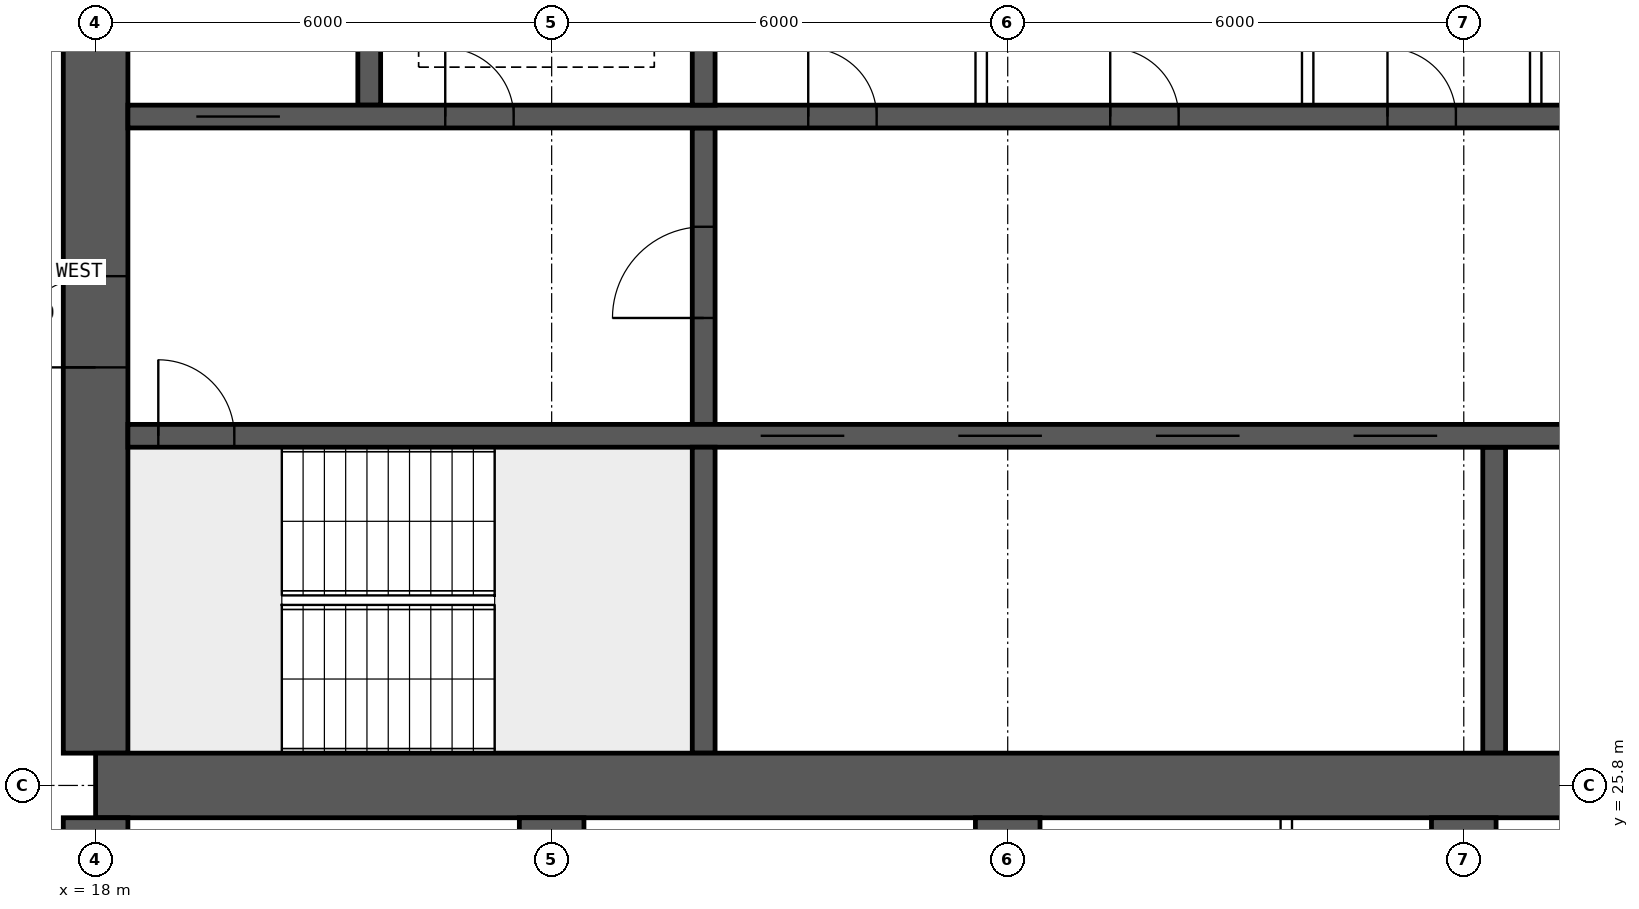
"""IFC4 building model, lengths in metres.
Left out: names, types, materials, properties, quantities, classifications, styles, units other than length and angle.
Written with IfcOpenShell. Run it as: python <this file> out.ifc"""

import sys

from ifc_helpers import new_model, si_unit, direction, frame, frame_2d, origin, place, context, subcontext, project, spatial, rectangle, extrude, element, fill, save


model = new_model("IFC4")
c1 = context("Model", 3, precision=1e-05, world=origin(), true_north=direction((0.0, 1.0)))
c2 = subcontext(c1, "Body", "Model", "MODEL_VIEW")
j1 = project(units=[si_unit("LENGTHUNIT", "METRE"), si_unit("PLANEANGLEUNIT", "RADIAN")], contexts=[c1])
p1 = place(None, origin())
s1 = spatial("IfcSite", under=j1, at=p1, CompositionType="ELEMENT")
p2 = place(p1, origin())
s2 = spatial("IfcBuilding", under=s1, at=p2, CompositionType="ELEMENT")
p3 = place(p2, frame((0.0, 0.0, 178.6)))
s3 = spatial("IfcBuildingStorey", under=s2, at=p3, CompositionType="ELEMENT", Elevation=178.6)
p4 = place(p3, frame((18.0, 25.8, 0.0), z_axis=(0.0, 0.0, 1.0), x_axis=(1.0, 0.0, 0.0)))
e1 = element("IfcWall", 1, at=p4, inside=s3, PredefinedType="SHEAR", context=c2, shape_type="SweptSolid", body=[
    extrude(rectangle(XDim=48.0, YDim=0.85, at=frame_2d((24.0, 0.0))), origin(), (0.0, 0.0, 1.0), 3.75),
])
p5 = place(p3, frame((18.0, 26.225, 0.0), z_axis=(0.0, 0.0, 1.0), x_axis=(0.0, 1.0, 0.0)))
e2 = element("IfcWall", 2, at=p5, inside=s3, PredefinedType="SHEAR", context=c2, shape_type="SweptSolid", body=[
    extrude(rectangle(XDim=11.55, YDim=0.85, at=frame_2d((5.775, 0.0))), origin(), (0.0, 0.0, 1.0), 3.75),
])
p6 = place(p5, frame((5.075, 0.0, 0.0)))
e3 = element("IfcOpeningElement", 3, at=p6, cuts=e2, PredefinedType="OPENING", context=c2, shape_type="SweptSolid", body=[
    extrude(rectangle(XDim=1.2, YDim=2.1, at=frame_2d((0.6, 1.05))), frame((0.0, 0.435, 0.0), z_axis=(0.0, -1.0, 0.0), x_axis=(1.0, 0.0, 0.0)), (0.0, 0.0, 1.0), 0.87),
])
p7 = place(p3, frame((18.425, 30.4, 0.0), z_axis=(0.0, 0.0, 1.0), x_axis=(1.0, 0.0, 0.0)))
e4 = element("IfcWall", 4, at=p7, inside=s3, PredefinedType="SHEAR", context=c2, shape_type="SweptSolid", body=[
    extrude(rectangle(XDim=47.15, YDim=0.3, at=frame_2d((23.575, 0.0))), origin(), (0.0, 0.0, 1.0), 3.75),
])
p8 = place(p7, frame((0.4, 0.0, 0.0)))
e5 = element("IfcOpeningElement", 5, at=p8, cuts=e4, PredefinedType="OPENING", context=c2, shape_type="SweptSolid", body=[
    extrude(rectangle(XDim=1.0, YDim=2.1, at=frame_2d((0.5, 1.05))), frame((0.0, 0.16, 0.0), z_axis=(0.0, -1.0, 0.0), x_axis=(1.0, 0.0, 0.0)), (0.0, 0.0, 1.0), 0.32),
])
p9 = place(p7, frame((45.75, 0.0, 0.0)))
e6 = element("IfcOpeningElement", 6, at=p9, cuts=e4, PredefinedType="OPENING", context=c2, shape_type="SweptSolid", body=[
    extrude(rectangle(XDim=1.0, YDim=2.1, at=frame_2d((0.5, 1.05))), frame((0.0, 0.16, 0.0), z_axis=(0.0, -1.0, 0.0), x_axis=(1.0, 0.0, 0.0)), (0.0, 0.0, 1.0), 0.32),
])
p10 = place(p7, frame((8.325, 0.0, 0.0)))
e7 = element("IfcOpeningElement", 7, at=p10, cuts=e4, PredefinedType="OPENING", context=c2, shape_type="SweptSolid", body=[
    extrude(rectangle(XDim=1.1, YDim=2.1, at=frame_2d((0.55, 1.05))), frame((0.0, 0.16, 0.0), z_axis=(0.0, -1.0, 0.0), x_axis=(1.0, 0.0, 0.0)), (0.0, 0.0, 1.0), 0.32),
])
p11 = place(p7, frame((10.925, 0.0, 0.0)))
e8 = element("IfcOpeningElement", 8, at=p11, cuts=e4, PredefinedType="OPENING", context=c2, shape_type="SweptSolid", body=[
    extrude(rectangle(XDim=1.1, YDim=2.1, at=frame_2d((0.55, 1.05))), frame((0.0, 0.16, 0.0), z_axis=(0.0, -1.0, 0.0), x_axis=(1.0, 0.0, 0.0)), (0.0, 0.0, 1.0), 0.32),
])
p12 = place(p7, frame((13.525, 0.0, 0.0)))
e9 = element("IfcOpeningElement", 9, at=p12, cuts=e4, PredefinedType="OPENING", context=c2, shape_type="SweptSolid", body=[
    extrude(rectangle(XDim=1.1, YDim=2.1, at=frame_2d((0.55, 1.05))), frame((0.0, 0.16, 0.0), z_axis=(0.0, -1.0, 0.0), x_axis=(1.0, 0.0, 0.0)), (0.0, 0.0, 1.0), 0.32),
])
p13 = place(p7, frame((16.125, 0.0, 0.0)))
e10 = element("IfcOpeningElement", 10, at=p13, cuts=e4, PredefinedType="OPENING", context=c2, shape_type="SweptSolid", body=[
    extrude(rectangle(XDim=1.1, YDim=2.1, at=frame_2d((0.55, 1.05))), frame((0.0, 0.16, 0.0), z_axis=(0.0, -1.0, 0.0), x_axis=(1.0, 0.0, 0.0)), (0.0, 0.0, 1.0), 0.32),
])
p14 = place(p7, frame((18.9, 0.0, 0.0)))
e11 = element("IfcOpeningElement", 11, at=p14, cuts=e4, PredefinedType="OPENING", context=c2, shape_type="SweptSolid", body=[
    extrude(rectangle(XDim=0.9, YDim=2.1, at=frame_2d((0.45, 1.05))), frame((0.0, 0.16, 0.0), z_axis=(0.0, -1.0, 0.0), x_axis=(1.0, 0.0, 0.0)), (0.0, 0.0, 1.0), 0.32),
])
p15 = place(p7, frame((30.192, 0.0, 0.0)))
e12 = element("IfcOpeningElement", 12, at=p15, cuts=e4, PredefinedType="OPENING", context=c2, shape_type="SweptSolid", body=[
    extrude(rectangle(XDim=1.1, YDim=2.1, at=frame_2d((0.55, 1.05))), frame((0.0, 0.16, 0.0), z_axis=(0.0, -1.0, 0.0), x_axis=(1.0, 0.0, 0.0)), (0.0, 0.0, 1.0), 0.32),
])
p16 = place(p7, frame((33.725, 0.0, 0.0)))
e13 = element("IfcOpeningElement", 13, at=p16, cuts=e4, PredefinedType="OPENING", context=c2, shape_type="SweptSolid", body=[
    extrude(rectangle(XDim=1.1, YDim=2.1, at=frame_2d((0.55, 1.05))), frame((0.0, 0.16, 0.0), z_axis=(0.0, -1.0, 0.0), x_axis=(1.0, 0.0, 0.0)), (0.0, 0.0, 1.0), 0.32),
])
p17 = place(p7, frame((37.258, 0.0, 0.0)))
e14 = element("IfcOpeningElement", 14, at=p17, cuts=e4, PredefinedType="OPENING", context=c2, shape_type="SweptSolid", body=[
    extrude(rectangle(XDim=1.1, YDim=2.1, at=frame_2d((0.55, 1.05))), frame((0.0, 0.16, 0.0), z_axis=(0.0, -1.0, 0.0), x_axis=(1.0, 0.0, 0.0)), (0.0, 0.0, 1.0), 0.32),
])
p18 = place(p3, frame((18.425, 34.6, 0.0), z_axis=(0.0, 0.0, 1.0), x_axis=(1.0, 0.0, 0.0)))
e15 = element("IfcWall", 15, at=p18, inside=s3, PredefinedType="SHEAR", context=c2, shape_type="SweptSolid", body=[
    extrude(rectangle(XDim=47.15, YDim=0.3, at=frame_2d((23.575, 0.0))), origin(), (0.0, 0.0, 1.0), 3.75),
])
p19 = place(p18, frame((0.9, 0.0, 0.0)))
e16 = element("IfcOpeningElement", 16, at=p19, cuts=e15, PredefinedType="OPENING", context=c2, shape_type="SweptSolid", body=[
    extrude(rectangle(XDim=1.1, YDim=2.1, at=frame_2d((0.55, 1.05))), frame((0.0, 0.16, 0.0), z_axis=(0.0, -1.0, 0.0), x_axis=(1.0, 0.0, 0.0)), (0.0, 0.0, 1.0), 0.32),
])
p20 = place(p18, frame((45.15, 0.0, 0.0)))
e17 = element("IfcOpeningElement", 17, at=p20, cuts=e15, PredefinedType="OPENING", context=c2, shape_type="SweptSolid", body=[
    extrude(rectangle(XDim=1.1, YDim=2.1, at=frame_2d((0.55, 1.05))), frame((0.0, 0.16, 0.0), z_axis=(0.0, -1.0, 0.0), x_axis=(1.0, 0.0, 0.0)), (0.0, 0.0, 1.0), 0.32),
])
p21 = place(p18, frame((4.175, 0.0, 0.0)))
e18 = element("IfcOpeningElement", 18, at=p21, cuts=e15, PredefinedType="OPENING", context=c2, shape_type="SweptSolid", body=[
    extrude(rectangle(XDim=0.9, YDim=2.1, at=frame_2d((0.45, 1.05))), frame((0.0, 0.16, 0.0), z_axis=(0.0, -1.0, 0.0), x_axis=(1.0, 0.0, 0.0)), (0.0, 0.0, 1.0), 0.32),
])
p22 = place(p18, frame((42.075, 0.0, 0.0)))
e19 = element("IfcOpeningElement", 19, at=p22, cuts=e15, PredefinedType="OPENING", context=c2, shape_type="SweptSolid", body=[
    extrude(rectangle(XDim=0.9, YDim=2.1, at=frame_2d((0.45, 1.05))), frame((0.0, 0.16, 0.0), z_axis=(0.0, -1.0, 0.0), x_axis=(1.0, 0.0, 0.0)), (0.0, 0.0, 1.0), 0.32),
])
p23 = place(p18, frame((8.95, 0.0, 0.0)))
e20 = element("IfcOpeningElement", 20, at=p23, cuts=e15, PredefinedType="OPENING", context=c2, shape_type="SweptSolid", body=[
    extrude(rectangle(XDim=0.9, YDim=2.1, at=frame_2d((0.45, 1.05))), frame((0.0, 0.16, 0.0), z_axis=(0.0, -1.0, 0.0), x_axis=(1.0, 0.0, 0.0)), (0.0, 0.0, 1.0), 0.32),
])
p24 = place(p18, frame((12.924, 0.0, 0.0)))
e21 = element("IfcOpeningElement", 21, at=p24, cuts=e15, PredefinedType="OPENING", context=c2, shape_type="SweptSolid", body=[
    extrude(rectangle(XDim=0.9, YDim=2.1, at=frame_2d((0.45, 1.05))), frame((0.0, 0.16, 0.0), z_axis=(0.0, -1.0, 0.0), x_axis=(1.0, 0.0, 0.0)), (0.0, 0.0, 1.0), 0.32),
])
p25 = place(p18, frame((16.571, 0.0, 0.0)))
e22 = element("IfcOpeningElement", 22, at=p25, cuts=e15, PredefinedType="OPENING", context=c2, shape_type="SweptSolid", body=[
    extrude(rectangle(XDim=0.9, YDim=2.1, at=frame_2d((0.45, 1.05))), frame((0.0, 0.16, 0.0), z_axis=(0.0, -1.0, 0.0), x_axis=(1.0, 0.0, 0.0)), (0.0, 0.0, 1.0), 0.32),
])
p26 = place(p18, frame((20.33, 0.0, 0.0)))
e23 = element("IfcOpeningElement", 23, at=p26, cuts=e15, PredefinedType="OPENING", context=c2, shape_type="SweptSolid", body=[
    extrude(rectangle(XDim=0.9, YDim=2.1, at=frame_2d((0.45, 1.05))), frame((0.0, 0.16, 0.0), z_axis=(0.0, -1.0, 0.0), x_axis=(1.0, 0.0, 0.0)), (0.0, 0.0, 1.0), 0.32),
])
p27 = place(p18, frame((24.736, 0.0, 0.0)))
e24 = element("IfcOpeningElement", 24, at=p27, cuts=e15, PredefinedType="OPENING", context=c2, shape_type="SweptSolid", body=[
    extrude(rectangle(XDim=0.9, YDim=2.1, at=frame_2d((0.45, 1.05))), frame((0.0, 0.16, 0.0), z_axis=(0.0, -1.0, 0.0), x_axis=(1.0, 0.0, 0.0)), (0.0, 0.0, 1.0), 0.32),
])
p28 = place(p18, frame((27.533, 0.0, 0.0)))
e25 = element("IfcOpeningElement", 25, at=p28, cuts=e15, PredefinedType="OPENING", context=c2, shape_type="SweptSolid", body=[
    extrude(rectangle(XDim=0.9, YDim=2.1, at=frame_2d((0.45, 1.05))), frame((0.0, 0.16, 0.0), z_axis=(0.0, -1.0, 0.0), x_axis=(1.0, 0.0, 0.0)), (0.0, 0.0, 1.0), 0.32),
])
p29 = place(p18, frame((33.654, 0.0, 0.0)))
e26 = element("IfcOpeningElement", 26, at=p29, cuts=e15, PredefinedType="OPENING", context=c2, shape_type="SweptSolid", body=[
    extrude(rectangle(XDim=0.9, YDim=2.1, at=frame_2d((0.45, 1.05))), frame((0.0, 0.16, 0.0), z_axis=(0.0, -1.0, 0.0), x_axis=(1.0, 0.0, 0.0)), (0.0, 0.0, 1.0), 0.32),
])
p30 = place(p3, frame((26.0, 26.225, 0.0), z_axis=(0.0, 0.0, 1.0), x_axis=(0.0, 1.0, 0.0)))
e27 = element("IfcWall", 27, at=p30, inside=s3, PredefinedType="SHEAR", context=c2, shape_type="SweptSolid", body=[
    extrude(rectangle(XDim=4.025, YDim=0.3, at=frame_2d((2.012, 0.0))), origin(), (0.0, 0.0, 1.0), 3.75),
])
p31 = place(p3, frame((26.0, 30.55, 0.0), z_axis=(0.0, 0.0, 1.0), x_axis=(0.0, 1.0, 0.0)))
e28 = element("IfcWall", 28, at=p31, inside=s3, PredefinedType="SHEAR", context=c2, shape_type="SweptSolid", body=[
    extrude(rectangle(XDim=3.9, YDim=0.3, at=frame_2d((1.95, 0.0))), origin(), (0.0, 0.0, 1.0), 3.75),
])
p32 = place(p31, frame((1.4, 0.0, 0.0)))
e29 = element("IfcOpeningElement", 29, at=p32, cuts=e28, PredefinedType="OPENING", context=c2, shape_type="SweptSolid", body=[
    extrude(rectangle(XDim=1.2, YDim=2.1, at=frame_2d((0.6, 1.05))), frame((0.0, 0.16, 0.0), z_axis=(0.0, -1.0, 0.0), x_axis=(1.0, 0.0, 0.0)), (0.0, 0.0, 1.0), 0.32),
])
for number, where, z_axis, x_axis in (
    (30, (21.6, 34.75, 0.0), (0.0, 0.0, 1.0), (0.0, 1.0, 0.0)),
    (31, (26.0, 34.75, 0.0), (0.0, 0.0, 1.0), (0.0, 1.0, 0.0)),
):
    element("IfcWall", number, at=place(p3, frame(where, z_axis=z_axis, x_axis=x_axis)), inside=s3, PredefinedType="SHEAR", context=c2, shape_type="SweptSolid", body=[
        extrude(rectangle(XDim=3.025, YDim=0.3, at=frame_2d((1.512, 0.0))), origin(), (0.0, 0.0, 1.0), 3.75),
    ])
p33 = place(p3, frame((36.4, 26.225, 0.0), z_axis=(0.0, 0.0, 1.0), x_axis=(0.0, 1.0, 0.0)))
e32 = element("IfcWall", 32, at=p33, inside=s3, PredefinedType="SHEAR", context=c2, shape_type="SweptSolid", body=[
    extrude(rectangle(XDim=4.025, YDim=0.3, at=frame_2d((2.012, 0.0))), origin(), (0.0, 0.0, 1.0), 3.75),
])
for number, where, z_axis, x_axis in (
    (33, (18.0, 17.2, 0.0), (0.0, 0.0, 1.0), (0.0, 1.0, 0.0)),
    (34, (24.0, 17.2, 0.0), (0.0, 0.0, 1.0), (0.0, 1.0, 0.0)),
    (35, (30.0, 17.2, 0.0), (0.0, 0.0, 1.0), (0.0, 1.0, 0.0)),
    (36, (36.0, 17.2, 0.0), (0.0, 0.0, 1.0), (0.0, 1.0, 0.0)),
):
    element("IfcWall", number, at=place(p3, frame(where, z_axis=z_axis, x_axis=x_axis)), inside=s3, PredefinedType="SHEAR", context=c2, shape_type="SweptSolid", body=[
        extrude(rectangle(XDim=8.175, YDim=0.85, at=frame_2d((4.087, 0.0))), origin(), (0.0, 0.0, 1.0), 3.75),
    ])
for number, where, z_axis, x_axis in (
    (37, (29.651, 34.75, 0.0), (0.0, 0.0, 1.0), (0.0, 1.0, 0.0)),
    (38, (33.946, 34.75, 0.0), (0.0, 0.0, 1.0), (0.0, 1.0, 0.0)),
    (39, (36.946, 34.75, 0.0), (0.0, 0.0, 1.0), (0.0, 1.0, 0.0)),
):
    element("IfcWall", number, at=place(p3, frame(where, z_axis=z_axis, x_axis=x_axis)), inside=s3, PredefinedType="SOLIDWALL", context=c2, shape_type="SweptSolid", body=[
        extrude(rectangle(XDim=3.025, YDim=0.15, at=frame_2d((1.512, 0.0))), origin(), (0.0, 0.0, 1.0), 3.5),
    ])
p34 = place(p3, frame((33.665, 17.3, 0.0), z_axis=(0.0, 0.0, 1.0), x_axis=(0.0, 1.0, 0.0)))
e40 = element("IfcWall", 40, at=p34, inside=s3, PredefinedType="PARTITIONING", context=c2, shape_type="SweptSolid", body=[
    extrude(rectangle(XDim=8.075, YDim=0.15, at=frame_2d((4.038, 0.0))), origin(), (0.0, 0.0, 1.0), 3.5),
])
p35 = place(p6, origin())
e41 = element("IfcDoor", 41, at=p35, inside=s3, OperationType="SINGLE_SWING_LEFT", PredefinedType="DOOR", context=c2, shape_type="SweptSolid", body=[
    extrude(rectangle(XDim=1.2, YDim=2.1, at=frame_2d((0.6, 1.05))), frame((0.0, 0.025, 0.0), z_axis=(0.0, -1.0, 0.0), x_axis=(1.0, 0.0, 0.0)), (0.0, 0.0, 1.0), 0.05),
])
fill(e3, e41)
p36 = place(p8, origin())
e42 = element("IfcDoor", 42, at=p36, inside=s3, OperationType="SINGLE_SWING_LEFT", PredefinedType="DOOR", context=c2, shape_type="SweptSolid", body=[
    extrude(rectangle(XDim=1.0, YDim=2.1, at=frame_2d((0.5, 1.05))), frame((0.0, 0.025, 0.0), z_axis=(0.0, -1.0, 0.0), x_axis=(1.0, 0.0, 0.0)), (0.0, 0.0, 1.0), 0.05),
])
fill(e5, e42)
p37 = place(p19, origin())
e43 = element("IfcDoor", 43, at=p37, inside=s3, OperationType="DOUBLE_DOOR_SLIDING", PredefinedType="DOOR", context=c2, shape_type="SweptSolid", body=[
    extrude(rectangle(XDim=1.1, YDim=2.1, at=frame_2d((0.55, 1.05))), frame((0.0, 0.025, 0.0), z_axis=(0.0, -1.0, 0.0), x_axis=(1.0, 0.0, 0.0)), (0.0, 0.0, 1.0), 0.05),
])
fill(e16, e43)
p38 = place(p21, origin())
e44 = element("IfcDoor", 44, at=p38, inside=s3, OperationType="SINGLE_SWING_LEFT", PredefinedType="DOOR", context=c2, shape_type="SweptSolid", body=[
    extrude(rectangle(XDim=0.9, YDim=2.1, at=frame_2d((0.45, 1.05))), frame((0.0, 0.025, 0.0), z_axis=(0.0, -1.0, 0.0), x_axis=(1.0, 0.0, 0.0)), (0.0, 0.0, 1.0), 0.05),
])
fill(e18, e44)
p39 = place(p32, origin())
e45 = element("IfcDoor", 45, at=p39, inside=s3, OperationType="SINGLE_SWING_LEFT", PredefinedType="DOOR", context=c2, shape_type="SweptSolid", body=[
    extrude(rectangle(XDim=1.2, YDim=2.1, at=frame_2d((0.6, 1.05))), frame((0.0, 0.025, 0.0), z_axis=(0.0, -1.0, 0.0), x_axis=(1.0, 0.0, 0.0)), (0.0, 0.0, 1.0), 0.05),
])
fill(e29, e45)
p40 = place(p23, origin())
e46 = element("IfcDoor", 46, at=p40, inside=s3, OperationType="SINGLE_SWING_LEFT", PredefinedType="DOOR", context=c2, shape_type="SweptSolid", body=[
    extrude(rectangle(XDim=0.9, YDim=2.1, at=frame_2d((0.45, 1.05))), frame((0.0, 0.025, 0.0), z_axis=(0.0, -1.0, 0.0), x_axis=(1.0, 0.0, 0.0)), (0.0, 0.0, 1.0), 0.05),
])
fill(e20, e46)
p41 = place(p24, origin())
e47 = element("IfcDoor", 47, at=p41, inside=s3, OperationType="SINGLE_SWING_LEFT", PredefinedType="DOOR", context=c2, shape_type="SweptSolid", body=[
    extrude(rectangle(XDim=0.9, YDim=2.1, at=frame_2d((0.45, 1.05))), frame((0.0, 0.025, 0.0), z_axis=(0.0, -1.0, 0.0), x_axis=(1.0, 0.0, 0.0)), (0.0, 0.0, 1.0), 0.05),
])
fill(e21, e47)
p42 = place(p25, origin())
e48 = element("IfcDoor", 48, at=p42, inside=s3, OperationType="SINGLE_SWING_LEFT", PredefinedType="DOOR", context=c2, shape_type="SweptSolid", body=[
    extrude(rectangle(XDim=0.9, YDim=2.1, at=frame_2d((0.45, 1.05))), frame((0.0, 0.025, 0.0), z_axis=(0.0, -1.0, 0.0), x_axis=(1.0, 0.0, 0.0)), (0.0, 0.0, 1.0), 0.05),
])
fill(e22, e48)
p43 = place(p10, origin())
e49 = element("IfcDoor", 49, at=p43, inside=s3, OperationType="DOUBLE_DOOR_SLIDING", PredefinedType="DOOR", context=c2, shape_type="SweptSolid", body=[
    extrude(rectangle(XDim=1.1, YDim=2.1, at=frame_2d((0.55, 1.05))), frame((0.0, 0.025, 0.0), z_axis=(0.0, -1.0, 0.0), x_axis=(1.0, 0.0, 0.0)), (0.0, 0.0, 1.0), 0.05),
])
fill(e7, e49)
p44 = place(p11, origin())
e50 = element("IfcDoor", 50, at=p44, inside=s3, OperationType="DOUBLE_DOOR_SLIDING", PredefinedType="DOOR", context=c2, shape_type="SweptSolid", body=[
    extrude(rectangle(XDim=1.1, YDim=2.1, at=frame_2d((0.55, 1.05))), frame((0.0, 0.025, 0.0), z_axis=(0.0, -1.0, 0.0), x_axis=(1.0, 0.0, 0.0)), (0.0, 0.0, 1.0), 0.05),
])
fill(e8, e50)
p45 = place(p12, origin())
e51 = element("IfcDoor", 51, at=p45, inside=s3, OperationType="DOUBLE_DOOR_SLIDING", PredefinedType="DOOR", context=c2, shape_type="SweptSolid", body=[
    extrude(rectangle(XDim=1.1, YDim=2.1, at=frame_2d((0.55, 1.05))), frame((0.0, 0.025, 0.0), z_axis=(0.0, -1.0, 0.0), x_axis=(1.0, 0.0, 0.0)), (0.0, 0.0, 1.0), 0.05),
])
fill(e9, e51)
p46 = place(p13, origin())
e52 = element("IfcDoor", 52, at=p46, inside=s3, OperationType="DOUBLE_DOOR_SLIDING", PredefinedType="DOOR", context=c2, shape_type="SweptSolid", body=[
    extrude(rectangle(XDim=1.1, YDim=2.1, at=frame_2d((0.55, 1.05))), frame((0.0, 0.025, 0.0), z_axis=(0.0, -1.0, 0.0), x_axis=(1.0, 0.0, 0.0)), (0.0, 0.0, 1.0), 0.05),
])
fill(e10, e52)
save(model, sys.argv[1])
